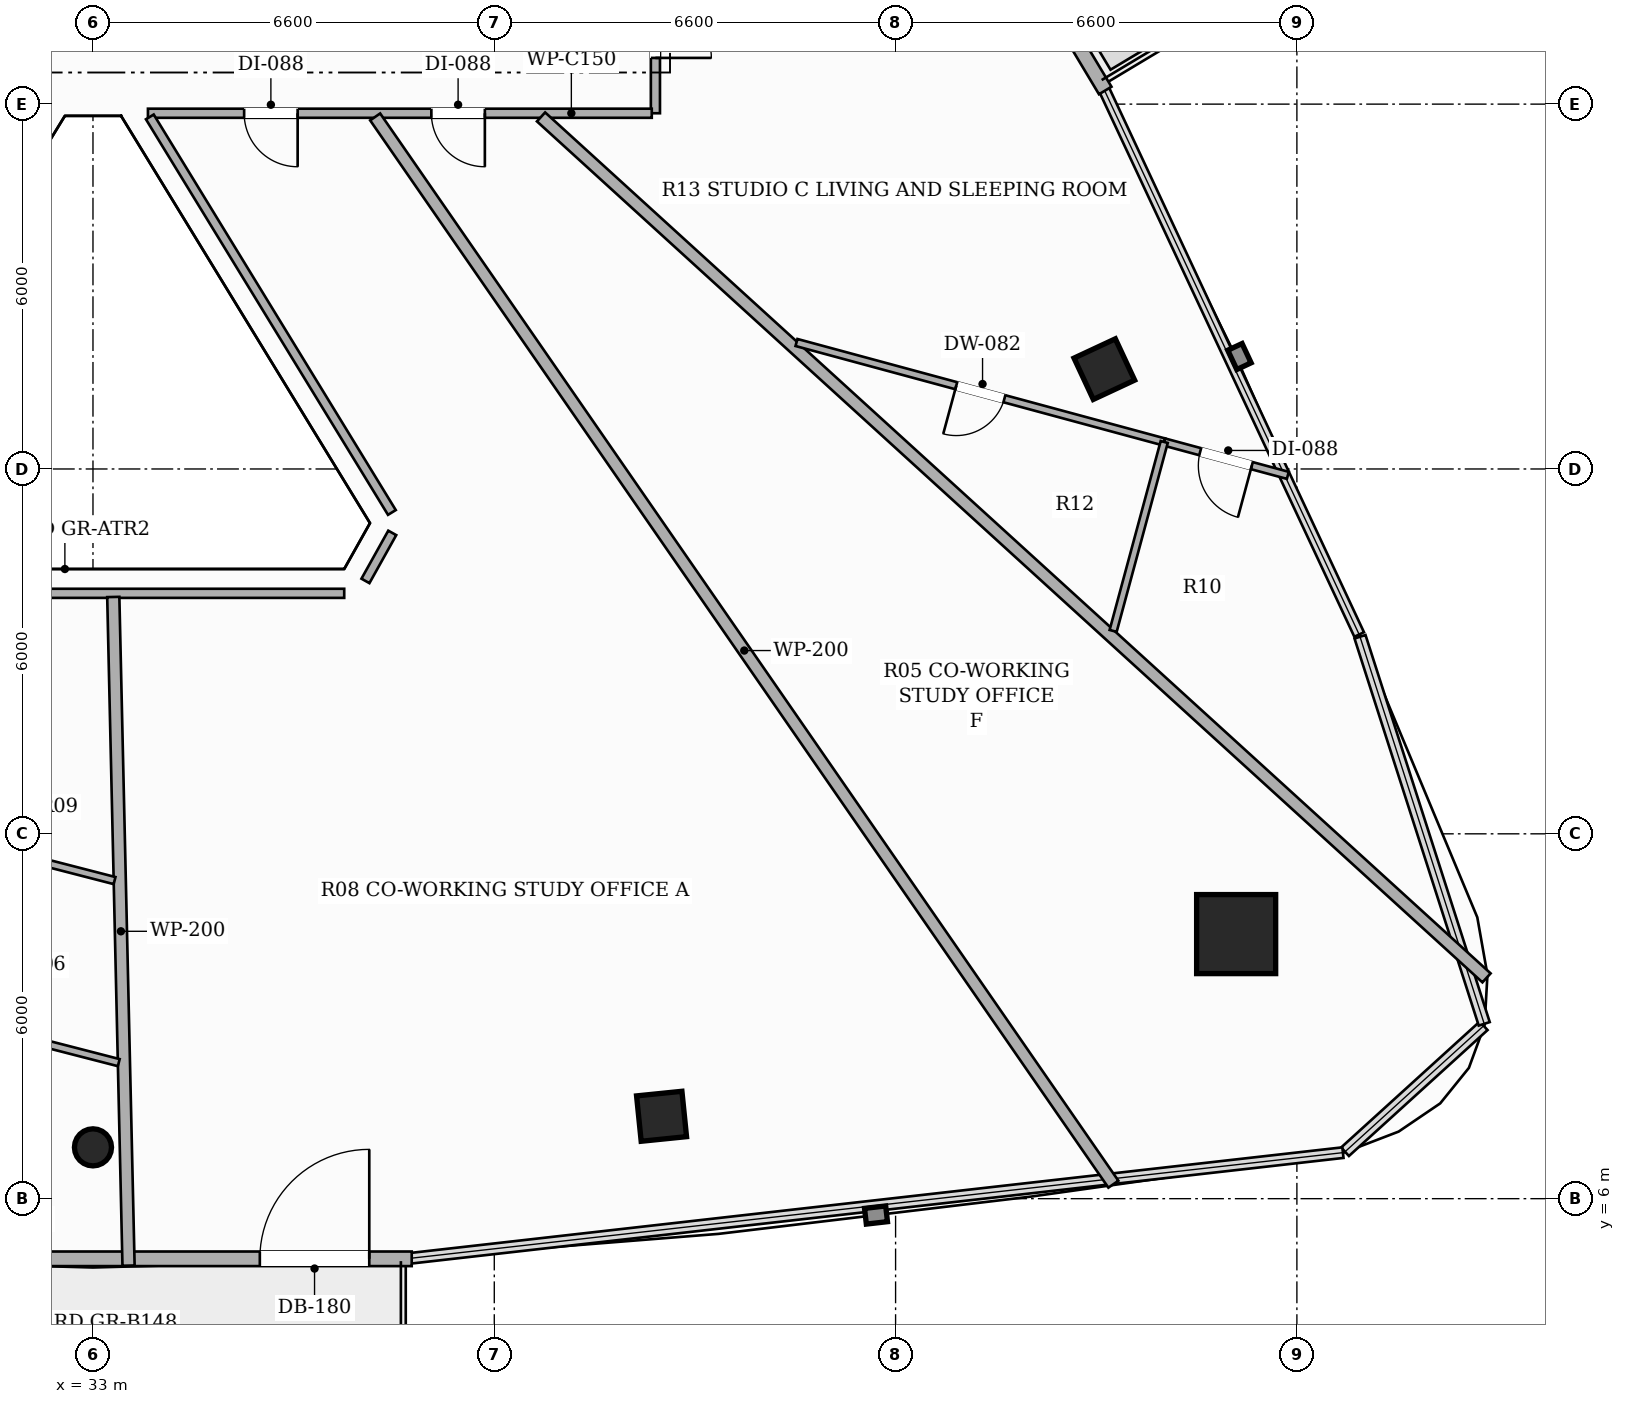
"""IFC4 building model, lengths in metres.
Left out: names, types, materials, properties, quantities, classifications, styles, units other than length and angle.
Written with IfcOpenShell. Run it as: python <this file> out.ifc"""

import sys

from ifc_helpers import new_model, si_unit, direction, frame, frame_2d, origin, origin_2d, place, context, subcontext, project, spatial, rectangle, hollow_rectangle, hollow_circle, extrude, element, fill, save


model = new_model("IFC4")
c1 = context("Model", 3, precision=1e-05, world=origin(), true_north=direction((0.0, 1.0)))
c2 = subcontext(c1, "Body", "Model", "MODEL_VIEW")
j1 = project(units=[si_unit("LENGTHUNIT", "METRE"), si_unit("PLANEANGLEUNIT", "RADIAN")], contexts=[c1])
p1 = place(None, origin())
s1 = spatial("IfcSite", under=j1, at=p1, CompositionType="ELEMENT")
p2 = place(p1, origin())
s2 = spatial("IfcBuilding", under=s1, at=p2, CompositionType="ELEMENT")
p3 = place(p2, frame((0.0, 0.0, 232.7)))
s3 = spatial("IfcBuildingStorey", under=s2, at=p3, CompositionType="ELEMENT", Elevation=232.7)
p4 = place(p3, frame((51.801, 10.351, 0.0), z_axis=(0.0, 0.0, 1.0), x_axis=(1.0, 0.0, 0.0)))
e1 = element("IfcColumn", 1, at=p4, inside=s3, PredefinedType="COLUMN", context=c2, shape_type="SweptSolid", body=[
    extrude(hollow_rectangle(XDim=1.3, YDim=1.3, WallThickness=0.04, at=origin_2d()), origin(), (0.0, 0.0, 1.0), 3.3),
])
p5 = place(p3, frame((33.0, 6.844, 0.0), z_axis=(0.0, 0.0, 1.0), x_axis=(1.0, 0.0, 0.0)))
e2 = element("IfcColumn", 2, at=p5, inside=s3, PredefinedType="COLUMN", context=c2, shape_type="SweptSolid", body=[
    extrude(hollow_circle(Radius=0.305, WallThickness=0.016, at=origin_2d()), origin(), (0.0, 0.0, 1.0), 3.3),
])
for number, where, z_axis, x_axis in (
    (3, (42.351, 7.355, 0.0), (0.0, 0.0, 1.0), (0.995, 0.101, 0.0)),
    (4, (49.633, 19.642, 0.0), (0.0, 0.0, 1.0), (-0.423, 0.906, 0.0)),
):
    element("IfcColumn", number, at=place(p3, frame(where, z_axis=z_axis, x_axis=x_axis)), inside=s3, PredefinedType="COLUMN", context=c2, shape_type="SweptSolid", body=[
        extrude(hollow_rectangle(XDim=0.75, YDim=0.75, WallThickness=0.025, at=origin_2d()), origin(), (0.0, 0.0, 1.0), 3.3),
    ])
p6 = place(p3, frame((27.758, 5.011, 0.0), z_axis=(0.0, 0.0, 1.0), x_axis=(1.0, 0.0, 0.0)))
e5 = element("IfcWall", 5, at=p6, inside=s3, PredefinedType="SOLIDWALL", context=c2, shape_type="SweptSolid", body=[
    extrude(rectangle(XDim=10.484, YDim=0.24, at=frame_2d((5.242, 0.0))), origin(), (0.0, 0.0, 1.0), 2.584),
])
p7 = place(p6, frame((7.986, 0.0, 0.0)))
e6 = element("IfcOpeningElement", 6, at=p7, cuts=e5, PredefinedType="OPENING", context=c2, shape_type="SweptSolid", body=[
    extrude(rectangle(XDim=1.8, YDim=2.2, at=frame_2d((0.9, 1.1))), frame((0.0, 0.13, 0.0), z_axis=(0.0, -1.0, 0.0), x_axis=(1.0, 0.0, 0.0)), (0.0, 0.0, 1.0), 0.26),
])
p8 = place(p3, frame((49.648, 24.224, 0.0), z_axis=(0.0, 0.0, 1.0), x_axis=(-0.514346935205, 0.857582200285, 0.0)))
e7 = element("IfcWall", 7, at=p8, inside=s3, PredefinedType="SOLIDWALL", context=c2, shape_type="SweptSolid", body=[
    extrude(rectangle(XDim=10.133, YDim=0.24, at=frame_2d((5.066, 0.0))), origin(), (0.0, 0.0, 1.0), 2.584),
])
p9 = place(p8, frame((7.635, 0.0, 0.0)))
e8 = element("IfcOpeningElement", 8, at=p9, cuts=e7, PredefinedType="OPENING", context=c2, shape_type="SweptSolid", body=[
    extrude(rectangle(XDim=1.8, YDim=2.2, at=frame_2d((0.9, 1.1))), frame((0.0, 0.13, 0.0), z_axis=(0.0, -1.0, 0.0), x_axis=(1.0, 0.0, 0.0)), (0.0, 0.0, 1.0), 0.26),
])
p10 = place(p3, frame((42.25, 26.59, 0.0), z_axis=(0.0, 0.0, 1.0), x_axis=(0.0, -1.0, 0.0)))
e9 = element("IfcWall", 9, at=p10, inside=s3, PredefinedType="PARTITIONING", context=c2, shape_type="SweptSolid", body=[
    extrude(rectangle(XDim=2.74, YDim=0.15, at=frame_2d((1.37, 0.0))), origin(), (0.0, 0.0, 1.0), 2.733),
])
p11 = place(p10, frame((0.91, 0.0, 0.0)))
e10 = element("IfcOpeningElement", 10, at=p11, cuts=e9, PredefinedType="OPENING", context=c2, shape_type="SweptSolid", body=[
    extrude(rectangle(XDim=0.92, YDim=2.15, at=frame_2d((0.46, 1.075))), frame((0.0, 0.085, 0.0), z_axis=(0.0, -1.0, 0.0), x_axis=(1.0, 0.0, 0.0)), (0.0, 0.0, 1.0), 0.17),
])
p12 = place(p3, frame((42.19, 23.85, 0.0), z_axis=(0.0, 0.0, 1.0), x_axis=(-1.0, 0.0, 0.0)))
e11 = element("IfcWall", 11, at=p12, inside=s3, PredefinedType="PARTITIONING", context=c2, shape_type="SweptSolid", body=[
    extrude(rectangle(XDim=8.286, YDim=0.15, at=frame_2d((4.143, 0.0))), origin(), (0.0, 0.0, 1.0), 2.525),
])
p13 = place(p12, frame((5.824, 0.0, 0.0)))
e12 = element("IfcOpeningElement", 12, at=p13, cuts=e11, PredefinedType="OPENING", context=c2, shape_type="SweptSolid", body=[
    extrude(rectangle(XDim=0.88, YDim=2.1, at=frame_2d((0.44, 1.05))), frame((0.0, 0.085, 0.0), z_axis=(0.0, -1.0, 0.0), x_axis=(1.0, 0.0, 0.0)), (0.0, 0.0, 1.0), 0.17),
])
p14 = place(p12, frame((2.745, 0.0, 0.0)))
e13 = element("IfcOpeningElement", 13, at=p14, cuts=e11, PredefinedType="OPENING", context=c2, shape_type="SweptSolid", body=[
    extrude(rectangle(XDim=0.88, YDim=2.1, at=frame_2d((0.44, 1.05))), frame((0.0, 0.085, 0.0), z_axis=(0.0, -1.0, 0.0), x_axis=(1.0, 0.0, 0.0)), (0.0, 0.0, 1.0), 0.17),
])
p15 = place(p3, frame((33.935, 23.79, 0.0), z_axis=(0.0, 0.0, 1.0), x_axis=(0.521984684225, -0.852954857794, 0.0)))
e14 = element("IfcWall", 14, at=p15, inside=s3, PredefinedType="PARTITIONING", context=c2, shape_type="SweptSolid", body=[
    extrude(rectangle(XDim=7.626, YDim=0.15, at=frame_2d((3.813, 0.0))), origin(), (0.0, 0.0, 1.0), 2.733),
])
p16 = place(p3, frame((37.922, 16.949, 0.0), z_axis=(0.0, 0.0, 1.0), x_axis=(-0.48754316559, -0.873098884255, 0.0)))
e15 = element("IfcWall", 15, at=p16, inside=s3, PredefinedType="PARTITIONING", context=c2, shape_type="SweptSolid", body=[
    extrude(rectangle(XDim=0.905, YDim=0.15, at=frame_2d((0.452, 0.0))), origin(), (0.0, 0.0, 1.0), 3.02),
])
p17 = place(p3, frame((37.132, 15.955, 0.0), z_axis=(0.0, 0.0, 1.0), x_axis=(-1.0, 0.0, 0.0)))
e16 = element("IfcWall", 16, at=p17, inside=s3, PredefinedType="PARTITIONING", context=c2, shape_type="SweptSolid", body=[
    extrude(rectangle(XDim=8.264, YDim=0.15, at=frame_2d((4.132, 0.0))), origin(), (0.0, 0.0, 1.0), 2.733),
])
p18 = place(p3, frame((33.585, 4.899, 0.0), z_axis=(0.0, 0.0, 1.0), x_axis=(-0.022818213595, 0.999739630668, 0.0)))
e17 = element("IfcWall", 17, at=p18, inside=s3, PredefinedType="PARTITIONING", context=c2, shape_type="SweptSolid", body=[
    extrude(rectangle(XDim=10.999, YDim=0.2, at=frame_2d((5.5, 0.0))), origin(), (0.0, 0.0, 1.0), 2.452),
])
p19 = place(p3, frame((37.641, 23.79, 0.0), z_axis=(0.0, 0.0, 1.0), x_axis=(0.568876812748, -0.822422745258, 0.0)))
e18 = element("IfcWall", 18, at=p19, inside=s3, PredefinedType="PARTITIONING", context=c2, shape_type="SweptSolid", body=[
    extrude(rectangle(XDim=21.342, YDim=0.2, at=frame_2d((10.671, 0.0))), origin(), (0.0, 0.0, 1.0), 2.452),
])
p20 = place(p3, frame((55.919, 9.631, 0.0), z_axis=(0.0, 0.0, 1.0), x_axis=(-0.739406671307, 0.673259069324, 0.0)))
e19 = element("IfcWall", 19, at=p20, inside=s3, PredefinedType="PARTITIONING", context=c2, shape_type="SweptSolid", body=[
    extrude(rectangle(XDim=21.031, YDim=0.2, at=frame_2d((10.515, 0.0))), origin(), (0.0, 0.0, 1.0), 2.452),
])
p21 = place(p3, frame((50.618, 18.444, 0.0), z_axis=(0.0, 0.0, 1.0), x_axis=(-0.96530580675, 0.261122001091, 0.0)))
e20 = element("IfcWall", 20, at=p21, inside=s3, PredefinedType="PARTITIONING", context=c2, shape_type="SweptSolid", body=[
    extrude(rectangle(XDim=6.265, YDim=0.12, at=frame_2d((3.133, 0.0))), origin(), (0.0, 0.0, 1.0), 2.452),
])
p22 = place(p21, frame((2.723, 0.0, 0.0)))
e21 = element("IfcOpeningElement", 21, at=p22, cuts=e20, PredefinedType="OPENING", context=c2, shape_type="SweptSolid", body=[
    extrude(rectangle(XDim=0.82, YDim=2.1, at=frame_2d((0.41, 1.05))), frame((0.0, 0.07, 0.0), z_axis=(0.0, -1.0, 0.0), x_axis=(1.0, 0.0, 0.0)), (0.0, 0.0, 1.0), 0.14),
])
p23 = place(p3, frame((52.651, 17.895, 0.0), z_axis=(0.0, 0.0, 1.0), x_axis=(-0.96540836449, 0.260742573765, 0.0)))
e22 = element("IfcWall", 22, at=p23, inside=s3, PredefinedType="PARTITIONING", context=c2, shape_type="SweptSolid", body=[
    extrude(rectangle(XDim=2.106, YDim=0.12, at=frame_2d((1.053, 0.0))), origin(), (0.0, 0.0, 1.0), 2.579),
])
p24 = place(p23, frame((0.613, 0.0, 0.0)))
e23 = element("IfcOpeningElement", 23, at=p24, cuts=e22, PredefinedType="OPENING", context=c2, shape_type="SweptSolid", body=[
    extrude(rectangle(XDim=0.88, YDim=2.1, at=frame_2d((0.44, 1.05))), frame((0.0, 0.07, 0.0), z_axis=(0.0, -1.0, 0.0), x_axis=(1.0, 0.0, 0.0)), (0.0, 0.0, 1.0), 0.14),
])
p25 = place(p3, frame((50.618, 18.444, 0.0), z_axis=(0.0, 0.0, 1.0), x_axis=(-0.260928129887, -0.965358229381, 0.0)))
e24 = element("IfcWall", 24, at=p25, inside=s3, PredefinedType="PARTITIONING", context=c2, shape_type="SweptSolid", body=[
    extrude(rectangle(XDim=3.219, YDim=0.12, at=frame_2d((1.609, 0.0))), origin(), (0.0, 0.0, 1.0), 2.452),
])
p26 = place(p3, frame((33.355, 11.231, 0.0), z_axis=(0.0, 0.0, 1.0), x_axis=(-0.968291630449, 0.249822573846, 0.0)))
e25 = element("IfcWall", 25, at=p26, inside=s3, PredefinedType="PARTITIONING", context=c2, shape_type="SweptSolid", body=[
    extrude(rectangle(XDim=2.93, YDim=0.12, at=frame_2d((1.465, 0.0))), origin(), (0.0, 0.0, 1.0), 2.733),
])
p27 = place(p3, frame((33.424, 8.237, 0.0), z_axis=(0.0, 0.0, 1.0), x_axis=(-0.968383623763, 0.249465743595, 0.0)))
e26 = element("IfcWall", 26, at=p27, inside=s3, PredefinedType="PARTITIONING", context=c2, shape_type="SweptSolid", body=[
    extrude(rectangle(XDim=3.743, YDim=0.12, at=frame_2d((1.872, 0.0))), origin(), (0.0, 0.0, 1.0), 2.733),
])
p28 = place(p7, origin())
e27 = element("IfcDoor", 27, at=p28, inside=s3, OperationType="SINGLE_SWING_RIGHT", PredefinedType="DOOR", context=c2, shape_type="SweptSolid", body=[
    extrude(rectangle(XDim=1.8, YDim=2.2, at=frame_2d((0.9, 1.1))), frame((0.0, 0.025, 0.0), z_axis=(0.0, -1.0, 0.0), x_axis=(1.0, 0.0, 0.0)), (0.0, 0.0, 1.0), 0.05),
])
fill(e6, e27)
p29 = place(p13, origin())
e28 = element("IfcDoor", 28, at=p29, inside=s3, OperationType="SINGLE_SWING_LEFT", PredefinedType="DOOR", context=c2, shape_type="SweptSolid", body=[
    extrude(rectangle(XDim=0.88, YDim=2.1, at=frame_2d((0.44, 1.05))), frame((0.0, 0.025, 0.0), z_axis=(0.0, -1.0, 0.0), x_axis=(1.0, 0.0, 0.0)), (0.0, 0.0, 1.0), 0.05),
])
fill(e12, e28)
p30 = place(p11, origin())
e29 = element("IfcDoor", 29, at=p30, inside=s3, OperationType="SINGLE_SWING_RIGHT", PredefinedType="DOOR", context=c2, shape_type="SweptSolid", body=[
    extrude(rectangle(XDim=0.92, YDim=2.15, at=frame_2d((0.46, 1.075))), frame((0.0, 0.025, 0.0), z_axis=(0.0, -1.0, 0.0), x_axis=(1.0, 0.0, 0.0)), (0.0, 0.0, 1.0), 0.05),
])
fill(e10, e29)
p31 = place(p22, origin())
e30 = element("IfcDoor", 30, at=p31, inside=s3, OperationType="SINGLE_SWING_RIGHT", PredefinedType="DOOR", context=c2, shape_type="SweptSolid", body=[
    extrude(rectangle(XDim=0.82, YDim=2.1, at=frame_2d((0.41, 1.05))), frame((0.0, 0.025, 0.0), z_axis=(0.0, -1.0, 0.0), x_axis=(1.0, 0.0, 0.0)), (0.0, 0.0, 1.0), 0.05),
])
fill(e21, e30)
p32 = place(p24, origin())
e31 = element("IfcDoor", 31, at=p32, inside=s3, OperationType="SINGLE_SWING_LEFT", PredefinedType="DOOR", context=c2, shape_type="SweptSolid", body=[
    extrude(rectangle(XDim=0.88, YDim=2.1, at=frame_2d((0.44, 1.05))), frame((0.0, 0.025, 0.0), z_axis=(0.0, -1.0, 0.0), x_axis=(1.0, 0.0, 0.0)), (0.0, 0.0, 1.0), 0.05),
])
fill(e23, e31)
p33 = place(p14, origin())
e32 = element("IfcDoor", 32, at=p33, inside=s3, OperationType="SINGLE_SWING_LEFT", PredefinedType="DOOR", context=c2, shape_type="SweptSolid", body=[
    extrude(rectangle(XDim=0.88, YDim=2.1, at=frame_2d((0.44, 1.05))), frame((0.0, 0.025, 0.0), z_axis=(0.0, -1.0, 0.0), x_axis=(1.0, 0.0, 0.0)), (0.0, 0.0, 1.0), 0.05),
])
fill(e13, e32)
save(model, sys.argv[1])
